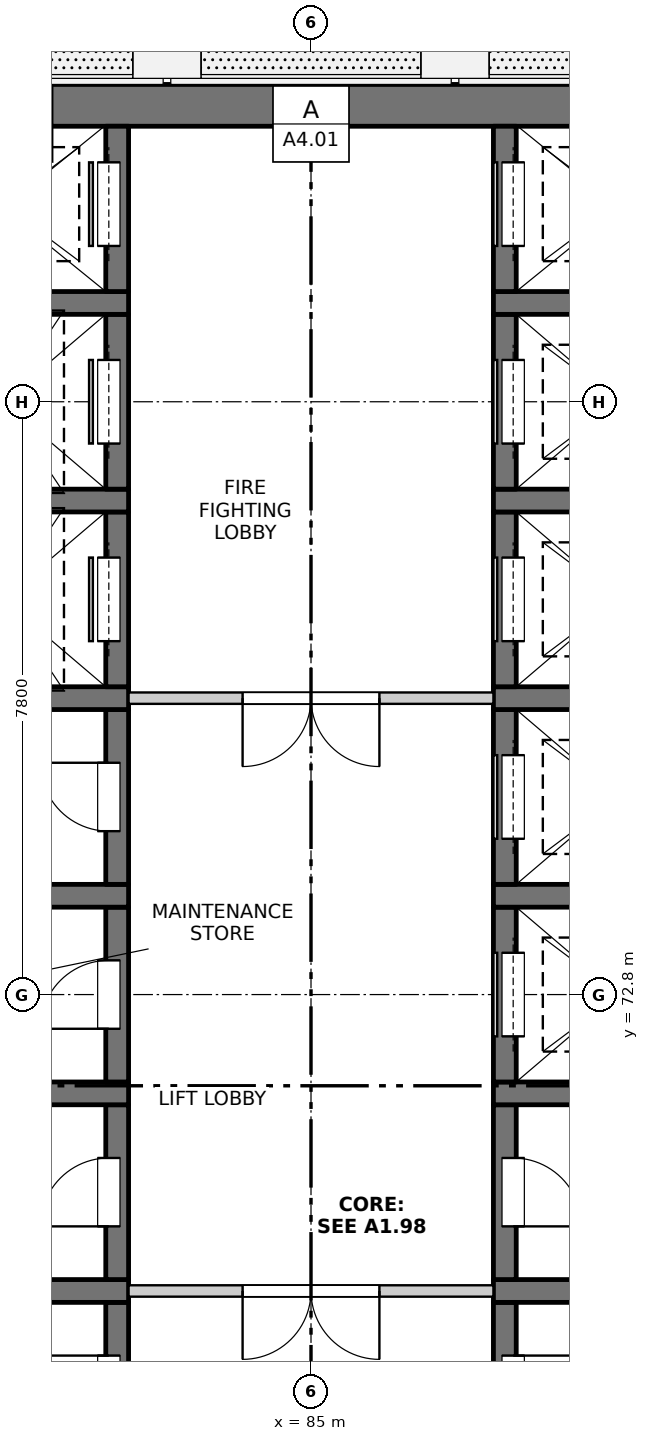
"""IFC4 building model, lengths in metres.
Left out: names, types, materials, properties, quantities, classifications, styles, units other than length and angle.
Written with IfcOpenShell. Run it as: python <this file> out.ifc"""

import sys

from ifc_helpers import new_model, si_unit, direction, frame, frame_2d, origin, place, context, subcontext, project, spatial, rectangle, extrude, element, fill, save


model = new_model("IFC4")
c1 = context("Model", 3, precision=1e-05, world=origin(), true_north=direction((0.0, 1.0)))
c2 = subcontext(c1, "Body", "Model", "MODEL_VIEW")
j1 = project(units=[si_unit("LENGTHUNIT", "METRE"), si_unit("PLANEANGLEUNIT", "RADIAN")], contexts=[c1])
p1 = place(None, origin())
s1 = spatial("IfcSite", under=j1, at=p1, CompositionType="ELEMENT")
p2 = place(p1, origin())
s2 = spatial("IfcBuilding", under=s1, at=p2, CompositionType="ELEMENT")
p3 = place(p2, frame((0.0, 0.0, 189.4)))
s3 = spatial("IfcBuildingStorey", under=s2, at=p3, CompositionType="ELEMENT", Elevation=189.4)
p4 = place(p3, frame((75.525, 84.5, -0.25), z_axis=(0.0, 0.0, 1.0), x_axis=(1.0, 0.0, 0.0)))
e1 = element("IfcWall", 1, at=p4, inside=s3, PredefinedType="SOLIDWALL", context=c2, shape_type="SweptSolid", body=[
    extrude(rectangle(XDim=18.95, YDim=0.55, at=frame_2d((9.475, 0.0))), origin(), (0.0, 0.0, 1.0), 3.35),
])
p5 = place(p3, frame((82.45, 66.45, -0.25), z_axis=(0.0, 0.0, 1.0), x_axis=(0.0, 1.0, 0.0)))
e2 = element("IfcWall", 2, at=p5, inside=s3, PredefinedType="SOLIDWALL", context=c2, shape_type="SweptSolid", body=[
    extrude(rectangle(XDim=2.3, YDim=0.3, at=frame_2d((1.15, 0.0))), origin(), (0.0, 0.0, 1.0), 3.35),
])
p6 = place(p5, frame((0.7, 0.0, 0.25)))
e3 = element("IfcOpeningElement", 3, at=p6, cuts=e2, PredefinedType="OPENING", context=c2, shape_type="SweptSolid", body=[
    extrude(rectangle(XDim=0.9, YDim=2.1, at=frame_2d((0.45, 1.05))), frame((0.0, 0.16, 0.0), z_axis=(0.0, -1.0, 0.0), x_axis=(1.0, 0.0, 0.0)), (0.0, 0.0, 1.0), 0.32),
])
p7 = place(p3, frame((79.6, 68.9, -0.25), z_axis=(0.0, 0.0, 1.0), x_axis=(1.0, 0.0, 0.0)))
e4 = element("IfcWall", 4, at=p7, inside=s3, PredefinedType="SOLIDWALL", context=c2, shape_type="SweptSolid", body=[
    extrude(rectangle(XDim=3.0, YDim=0.3, at=frame_2d((1.5, 0.0))), origin(), (0.0, 0.0, 1.0), 3.35),
])
p8 = place(p3, frame((82.45, 69.05, -0.25), z_axis=(0.0, 0.0, 1.0), x_axis=(0.0, 1.0, 0.0)))
e5 = element("IfcWall", 5, at=p8, inside=s3, PredefinedType="SOLIDWALL", context=c2, shape_type="SweptSolid", body=[
    extrude(rectangle(XDim=2.3, YDim=0.3, at=frame_2d((1.15, 0.0))), origin(), (0.0, 0.0, 1.0), 3.35),
])
p9 = place(p8, frame((0.7, 0.0, 0.25)))
e6 = element("IfcOpeningElement", 6, at=p9, cuts=e5, PredefinedType="OPENING", context=c2, shape_type="SweptSolid", body=[
    extrude(rectangle(XDim=0.9, YDim=2.1, at=frame_2d((0.45, 1.05))), frame((0.0, 0.16, 0.0), z_axis=(0.0, -1.0, 0.0), x_axis=(1.0, 0.0, 0.0)), (0.0, 0.0, 1.0), 0.32),
])
p10 = place(p3, frame((79.6, 71.5, -0.25), z_axis=(0.0, 0.0, 1.0), x_axis=(1.0, 0.0, 0.0)))
e7 = element("IfcWall", 7, at=p10, inside=s3, PredefinedType="SOLIDWALL", context=c2, shape_type="SweptSolid", body=[
    extrude(rectangle(XDim=3.0, YDim=0.3, at=frame_2d((1.5, 0.0))), origin(), (0.0, 0.0, 1.0), 3.35),
])
p11 = place(p3, frame((82.45, 71.65, -0.25), z_axis=(0.0, 0.0, 1.0), x_axis=(0.0, 1.0, 0.0)))
e8 = element("IfcWall", 8, at=p11, inside=s3, PredefinedType="SOLIDWALL", context=c2, shape_type="SweptSolid", body=[
    extrude(rectangle(XDim=2.3, YDim=0.3, at=frame_2d((1.15, 0.0))), origin(), (0.0, 0.0, 1.0), 3.35),
])
p12 = place(p11, frame((0.7, 0.0, 0.25)))
e9 = element("IfcOpeningElement", 9, at=p12, cuts=e8, PredefinedType="OPENING", context=c2, shape_type="SweptSolid", body=[
    extrude(rectangle(XDim=0.9, YDim=2.1, at=frame_2d((0.45, 1.05))), frame((0.0, 0.16, 0.0), z_axis=(0.0, -1.0, 0.0), x_axis=(1.0, 0.0, 0.0)), (0.0, 0.0, 1.0), 0.32),
])
p13 = place(p3, frame((79.6, 74.1, -0.25), z_axis=(0.0, 0.0, 1.0), x_axis=(1.0, 0.0, 0.0)))
e10 = element("IfcWall", 10, at=p13, inside=s3, PredefinedType="SOLIDWALL", context=c2, shape_type="SweptSolid", body=[
    extrude(rectangle(XDim=3.0, YDim=0.3, at=frame_2d((1.5, 0.0))), origin(), (0.0, 0.0, 1.0), 3.35),
])
p14 = place(p3, frame((82.45, 74.25, -0.25), z_axis=(0.0, 0.0, 1.0), x_axis=(0.0, 1.0, 0.0)))
e11 = element("IfcWall", 11, at=p14, inside=s3, PredefinedType="SOLIDWALL", context=c2, shape_type="SweptSolid", body=[
    extrude(rectangle(XDim=2.3, YDim=0.3, at=frame_2d((1.15, 0.0))), origin(), (0.0, 0.0, 1.0), 3.35),
])
p15 = place(p14, frame((0.7, 0.0, 0.25)))
e12 = element("IfcOpeningElement", 12, at=p15, cuts=e11, PredefinedType="OPENING", context=c2, shape_type="SweptSolid", body=[
    extrude(rectangle(XDim=0.9, YDim=2.1, at=frame_2d((0.45, 1.05))), frame((0.0, 0.16, 0.0), z_axis=(0.0, -1.0, 0.0), x_axis=(1.0, 0.0, 0.0)), (0.0, 0.0, 1.0), 0.32),
])
p16 = place(p3, frame((79.6, 76.7, -0.25), z_axis=(0.0, 0.0, 1.0), x_axis=(1.0, 0.0, 0.0)))
e13 = element("IfcWall", 13, at=p16, inside=s3, PredefinedType="SOLIDWALL", context=c2, shape_type="SweptSolid", body=[
    extrude(rectangle(XDim=3.0, YDim=0.3, at=frame_2d((1.5, 0.0))), origin(), (0.0, 0.0, 1.0), 3.35),
])
p17 = place(p3, frame((82.45, 76.85, -0.25), z_axis=(0.0, 0.0, 1.0), x_axis=(0.0, 1.0, 0.0)))
e14 = element("IfcWall", 14, at=p17, inside=s3, PredefinedType="SOLIDWALL", context=c2, shape_type="SweptSolid", body=[
    extrude(rectangle(XDim=2.3, YDim=0.3, at=frame_2d((1.15, 0.0))), origin(), (0.0, 0.0, 1.0), 3.35),
])
p18 = place(p17, frame((0.6, 0.0, 0.25)))
e15 = element("IfcOpeningElement", 15, at=p18, cuts=e14, PredefinedType="OPENING", context=c2, shape_type="SweptSolid", body=[
    extrude(rectangle(XDim=1.1, YDim=2.1, at=frame_2d((0.55, 1.05))), frame((0.0, 0.16, 0.0), z_axis=(0.0, -1.0, 0.0), x_axis=(1.0, 0.0, 0.0)), (0.0, 0.0, 1.0), 0.32),
])
p19 = place(p3, frame((79.6, 79.3, -0.25), z_axis=(0.0, 0.0, 1.0), x_axis=(1.0, 0.0, 0.0)))
e16 = element("IfcWall", 16, at=p19, inside=s3, PredefinedType="SOLIDWALL", context=c2, shape_type="SweptSolid", body=[
    extrude(rectangle(XDim=3.0, YDim=0.3, at=frame_2d((1.5, 0.0))), origin(), (0.0, 0.0, 1.0), 3.35),
])
p20 = place(p3, frame((82.45, 79.45, -0.25), z_axis=(0.0, 0.0, 1.0), x_axis=(0.0, 1.0, 0.0)))
e17 = element("IfcWall", 17, at=p20, inside=s3, PredefinedType="SOLIDWALL", context=c2, shape_type="SweptSolid", body=[
    extrude(rectangle(XDim=2.3, YDim=0.3, at=frame_2d((1.15, 0.0))), origin(), (0.0, 0.0, 1.0), 3.35),
])
p21 = place(p20, frame((0.6, 0.0, 0.25)))
e18 = element("IfcOpeningElement", 18, at=p21, cuts=e17, PredefinedType="OPENING", context=c2, shape_type="SweptSolid", body=[
    extrude(rectangle(XDim=1.1, YDim=2.1, at=frame_2d((0.55, 1.05))), frame((0.0, 0.16, 0.0), z_axis=(0.0, -1.0, 0.0), x_axis=(1.0, 0.0, 0.0)), (0.0, 0.0, 1.0), 0.32),
])
p22 = place(p3, frame((79.6, 81.9, -0.25), z_axis=(0.0, 0.0, 1.0), x_axis=(1.0, 0.0, 0.0)))
e19 = element("IfcWall", 19, at=p22, inside=s3, PredefinedType="SOLIDWALL", context=c2, shape_type="SweptSolid", body=[
    extrude(rectangle(XDim=3.0, YDim=0.3, at=frame_2d((1.5, 0.0))), origin(), (0.0, 0.0, 1.0), 3.35),
])
p23 = place(p3, frame((82.45, 82.05, -0.25), z_axis=(0.0, 0.0, 1.0), x_axis=(0.0, 1.0, 0.0)))
e20 = element("IfcWall", 20, at=p23, inside=s3, PredefinedType="SOLIDWALL", context=c2, shape_type="SweptSolid", body=[
    extrude(rectangle(XDim=2.175, YDim=0.3, at=frame_2d((1.087, 0.0))), origin(), (0.0, 0.0, 1.0), 3.35),
])
p24 = place(p23, frame((0.6, 0.0, 0.25)))
e21 = element("IfcOpeningElement", 21, at=p24, cuts=e20, PredefinedType="OPENING", context=c2, shape_type="SweptSolid", body=[
    extrude(rectangle(XDim=1.1, YDim=2.1, at=frame_2d((0.55, 1.05))), frame((0.0, 0.16, 0.0), z_axis=(0.0, -1.0, 0.0), x_axis=(1.0, 0.0, 0.0)), (0.0, 0.0, 1.0), 0.32),
])
p25 = place(p3, frame((87.55, 66.45, -0.25), z_axis=(0.0, 0.0, 1.0), x_axis=(0.0, 1.0, 0.0)))
e22 = element("IfcWall", 22, at=p25, inside=s3, PredefinedType="SOLIDWALL", context=c2, shape_type="SweptSolid", body=[
    extrude(rectangle(XDim=2.3, YDim=0.3, at=frame_2d((1.15, 0.0))), origin(), (0.0, 0.0, 1.0), 3.35),
])
p26 = place(p25, frame((0.7, 0.0, 0.25)))
e23 = element("IfcOpeningElement", 23, at=p26, cuts=e22, PredefinedType="OPENING", context=c2, shape_type="SweptSolid", body=[
    extrude(rectangle(XDim=0.9, YDim=2.1, at=frame_2d((0.45, 1.05))), frame((0.0, 0.16, 0.0), z_axis=(0.0, -1.0, 0.0), x_axis=(1.0, 0.0, 0.0)), (0.0, 0.0, 1.0), 0.32),
])
p27 = place(p3, frame((87.4, 68.9, -0.25), z_axis=(0.0, 0.0, 1.0), x_axis=(1.0, 0.0, 0.0)))
e24 = element("IfcWall", 24, at=p27, inside=s3, PredefinedType="SOLIDWALL", context=c2, shape_type="SweptSolid", body=[
    extrude(rectangle(XDim=3.0, YDim=0.3, at=frame_2d((1.5, 0.0))), origin(), (0.0, 0.0, 1.0), 3.35),
])
p28 = place(p3, frame((87.55, 69.05, -0.25), z_axis=(0.0, 0.0, 1.0), x_axis=(0.0, 1.0, 0.0)))
e25 = element("IfcWall", 25, at=p28, inside=s3, PredefinedType="SOLIDWALL", context=c2, shape_type="SweptSolid", body=[
    extrude(rectangle(XDim=2.3, YDim=0.3, at=frame_2d((1.15, 0.0))), origin(), (0.0, 0.0, 1.0), 3.35),
])
p29 = place(p28, frame((0.7, 0.0, 0.25)))
e26 = element("IfcOpeningElement", 26, at=p29, cuts=e25, PredefinedType="OPENING", context=c2, shape_type="SweptSolid", body=[
    extrude(rectangle(XDim=0.9, YDim=2.1, at=frame_2d((0.45, 1.05))), frame((0.0, 0.16, 0.0), z_axis=(0.0, -1.0, 0.0), x_axis=(1.0, 0.0, 0.0)), (0.0, 0.0, 1.0), 0.32),
])
p30 = place(p3, frame((87.4, 71.5, -0.25), z_axis=(0.0, 0.0, 1.0), x_axis=(1.0, 0.0, 0.0)))
e27 = element("IfcWall", 27, at=p30, inside=s3, PredefinedType="SOLIDWALL", context=c2, shape_type="SweptSolid", body=[
    extrude(rectangle(XDim=3.0, YDim=0.3, at=frame_2d((1.5, 0.0))), origin(), (0.0, 0.0, 1.0), 3.35),
])
p31 = place(p3, frame((87.55, 71.65, -0.25), z_axis=(0.0, 0.0, 1.0), x_axis=(0.0, 1.0, 0.0)))
e28 = element("IfcWall", 28, at=p31, inside=s3, PredefinedType="SOLIDWALL", context=c2, shape_type="SweptSolid", body=[
    extrude(rectangle(XDim=2.3, YDim=0.3, at=frame_2d((1.15, 0.0))), origin(), (0.0, 0.0, 1.0), 3.35),
])
p32 = place(p31, frame((0.6, 0.0, 0.25)))
e29 = element("IfcOpeningElement", 29, at=p32, cuts=e28, PredefinedType="OPENING", context=c2, shape_type="SweptSolid", body=[
    extrude(rectangle(XDim=1.1, YDim=2.1, at=frame_2d((0.55, 1.05))), frame((0.0, 0.16, 0.0), z_axis=(0.0, -1.0, 0.0), x_axis=(1.0, 0.0, 0.0)), (0.0, 0.0, 1.0), 0.32),
])
p33 = place(p3, frame((87.4, 74.1, -0.25), z_axis=(0.0, 0.0, 1.0), x_axis=(1.0, 0.0, 0.0)))
e30 = element("IfcWall", 30, at=p33, inside=s3, PredefinedType="SOLIDWALL", context=c2, shape_type="SweptSolid", body=[
    extrude(rectangle(XDim=3.0, YDim=0.3, at=frame_2d((1.5, 0.0))), origin(), (0.0, 0.0, 1.0), 3.35),
])
p34 = place(p3, frame((87.55, 74.25, -0.25), z_axis=(0.0, 0.0, 1.0), x_axis=(0.0, 1.0, 0.0)))
e31 = element("IfcWall", 31, at=p34, inside=s3, PredefinedType="SOLIDWALL", context=c2, shape_type="SweptSolid", body=[
    extrude(rectangle(XDim=2.3, YDim=0.3, at=frame_2d((1.15, 0.0))), origin(), (0.0, 0.0, 1.0), 3.35),
])
p35 = place(p34, frame((0.6, 0.0, 0.25)))
e32 = element("IfcOpeningElement", 32, at=p35, cuts=e31, PredefinedType="OPENING", context=c2, shape_type="SweptSolid", body=[
    extrude(rectangle(XDim=1.1, YDim=2.1, at=frame_2d((0.55, 1.05))), frame((0.0, 0.16, 0.0), z_axis=(0.0, -1.0, 0.0), x_axis=(1.0, 0.0, 0.0)), (0.0, 0.0, 1.0), 0.32),
])
p36 = place(p3, frame((87.4, 76.7, -0.25), z_axis=(0.0, 0.0, 1.0), x_axis=(1.0, 0.0, 0.0)))
e33 = element("IfcWall", 33, at=p36, inside=s3, PredefinedType="SOLIDWALL", context=c2, shape_type="SweptSolid", body=[
    extrude(rectangle(XDim=3.0, YDim=0.3, at=frame_2d((1.5, 0.0))), origin(), (0.0, 0.0, 1.0), 3.35),
])
p37 = place(p3, frame((87.55, 76.85, -0.25), z_axis=(0.0, 0.0, 1.0), x_axis=(0.0, 1.0, 0.0)))
e34 = element("IfcWall", 34, at=p37, inside=s3, PredefinedType="SOLIDWALL", context=c2, shape_type="SweptSolid", body=[
    extrude(rectangle(XDim=2.3, YDim=0.3, at=frame_2d((1.15, 0.0))), origin(), (0.0, 0.0, 1.0), 3.35),
])
p38 = place(p37, frame((0.6, 0.0, 0.25)))
e35 = element("IfcOpeningElement", 35, at=p38, cuts=e34, PredefinedType="OPENING", context=c2, shape_type="SweptSolid", body=[
    extrude(rectangle(XDim=1.1, YDim=2.1, at=frame_2d((0.55, 1.05))), frame((0.0, 0.16, 0.0), z_axis=(0.0, -1.0, 0.0), x_axis=(1.0, 0.0, 0.0)), (0.0, 0.0, 1.0), 0.32),
])
p39 = place(p3, frame((87.4, 79.3, -0.25), z_axis=(0.0, 0.0, 1.0), x_axis=(1.0, 0.0, 0.0)))
e36 = element("IfcWall", 36, at=p39, inside=s3, PredefinedType="SOLIDWALL", context=c2, shape_type="SweptSolid", body=[
    extrude(rectangle(XDim=3.0, YDim=0.3, at=frame_2d((1.5, 0.0))), origin(), (0.0, 0.0, 1.0), 3.35),
])
p40 = place(p3, frame((87.55, 79.45, -0.25), z_axis=(0.0, 0.0, 1.0), x_axis=(0.0, 1.0, 0.0)))
e37 = element("IfcWall", 37, at=p40, inside=s3, PredefinedType="SOLIDWALL", context=c2, shape_type="SweptSolid", body=[
    extrude(rectangle(XDim=2.3, YDim=0.3, at=frame_2d((1.15, 0.0))), origin(), (0.0, 0.0, 1.0), 3.35),
])
p41 = place(p40, frame((0.6, 0.0, 0.25)))
e38 = element("IfcOpeningElement", 38, at=p41, cuts=e37, PredefinedType="OPENING", context=c2, shape_type="SweptSolid", body=[
    extrude(rectangle(XDim=1.1, YDim=2.1, at=frame_2d((0.55, 1.05))), frame((0.0, 0.16, 0.0), z_axis=(0.0, -1.0, 0.0), x_axis=(1.0, 0.0, 0.0)), (0.0, 0.0, 1.0), 0.32),
])
p42 = place(p3, frame((87.4, 81.9, -0.25), z_axis=(0.0, 0.0, 1.0), x_axis=(1.0, 0.0, 0.0)))
e39 = element("IfcWall", 39, at=p42, inside=s3, PredefinedType="SOLIDWALL", context=c2, shape_type="SweptSolid", body=[
    extrude(rectangle(XDim=3.0, YDim=0.3, at=frame_2d((1.5, 0.0))), origin(), (0.0, 0.0, 1.0), 3.35),
])
p43 = place(p3, frame((87.55, 82.05, -0.25), z_axis=(0.0, 0.0, 1.0), x_axis=(0.0, 1.0, 0.0)))
e40 = element("IfcWall", 40, at=p43, inside=s3, PredefinedType="SOLIDWALL", context=c2, shape_type="SweptSolid", body=[
    extrude(rectangle(XDim=2.175, YDim=0.3, at=frame_2d((1.087, 0.0))), origin(), (0.0, 0.0, 1.0), 3.35),
])
p44 = place(p43, frame((0.6, 0.0, 0.25)))
e41 = element("IfcOpeningElement", 41, at=p44, cuts=e40, PredefinedType="OPENING", context=c2, shape_type="SweptSolid", body=[
    extrude(rectangle(XDim=1.1, YDim=2.1, at=frame_2d((0.55, 1.05))), frame((0.0, 0.16, 0.0), z_axis=(0.0, -1.0, 0.0), x_axis=(1.0, 0.0, 0.0)), (0.0, 0.0, 1.0), 0.32),
])
p45 = place(p3, frame((82.6, 68.9, 0.0), z_axis=(0.0, 0.0, 1.0), x_axis=(1.0, 0.0, 0.0)))
e42 = element("IfcWall", 42, at=p45, inside=s3, PredefinedType="PARTITIONING", context=c2, shape_type="SweptSolid", body=[
    extrude(rectangle(XDim=4.8, YDim=0.15, at=frame_2d((2.4, 0.0))), origin(), (0.0, 0.0, 1.0), 3.1),
])
p46 = place(p45, frame((1.5, 0.0, 0.0)))
e43 = element("IfcOpeningElement", 43, at=p46, cuts=e42, PredefinedType="OPENING", context=c2, shape_type="SweptSolid", body=[
    extrude(rectangle(XDim=1.8, YDim=2.1, at=frame_2d((0.9, 1.05))), frame((0.0, 0.085, 0.0), z_axis=(0.0, -1.0, 0.0), x_axis=(1.0, 0.0, 0.0)), (0.0, 0.0, 1.0), 0.17),
])
p47 = place(p3, frame((82.6, 76.7, 0.0), z_axis=(0.0, 0.0, 1.0), x_axis=(1.0, 0.0, 0.0)))
e44 = element("IfcWall", 44, at=p47, inside=s3, PredefinedType="PARTITIONING", context=c2, shape_type="SweptSolid", body=[
    extrude(rectangle(XDim=4.8, YDim=0.15, at=frame_2d((2.4, 0.0))), origin(), (0.0, 0.0, 1.0), 3.1),
])
p48 = place(p47, frame((1.5, 0.0, 0.0)))
e45 = element("IfcOpeningElement", 45, at=p48, cuts=e44, PredefinedType="OPENING", context=c2, shape_type="SweptSolid", body=[
    extrude(rectangle(XDim=1.8, YDim=2.1, at=frame_2d((0.9, 1.05))), frame((0.0, 0.085, 0.0), z_axis=(0.0, -1.0, 0.0), x_axis=(1.0, 0.0, 0.0)), (0.0, 0.0, 1.0), 0.17),
])
p49 = place(p6, origin())
e46 = element("IfcDoor", 46, at=p49, inside=s3, OperationType="SINGLE_SWING_RIGHT", PredefinedType="DOOR", context=c2, shape_type="SweptSolid", body=[
    extrude(rectangle(XDim=0.9, YDim=2.1, at=frame_2d((0.45, 1.05))), frame((0.0, 0.135, 0.0), z_axis=(0.0, -1.0, 0.0), x_axis=(1.0, 0.0, 0.0)), (0.0, 0.0, 1.0), 0.05),
])
fill(e3, e46)
p50 = place(p26, origin())
e47 = element("IfcDoor", 47, at=p50, inside=s3, OperationType="SINGLE_SWING_LEFT", PredefinedType="DOOR", context=c2, shape_type="SweptSolid", body=[
    extrude(rectangle(XDim=0.9, YDim=2.1, at=frame_2d((0.45, 1.05))), frame((0.0, -0.085, 0.0), z_axis=(0.0, -1.0, 0.0), x_axis=(1.0, 0.0, 0.0)), (0.0, 0.0, 1.0), 0.05),
])
fill(e23, e47)
p51 = place(p46, origin())
e48 = element("IfcDoor", 48, at=p51, inside=s3, OperationType="DOUBLE_DOOR_SINGLE_SWING", PredefinedType="DOOR", context=c2, shape_type="SweptSolid", body=[
    extrude(rectangle(XDim=1.8, YDim=2.1, at=frame_2d((0.9, 1.05))), frame((0.0, 0.025, 0.0), z_axis=(0.0, -1.0, 0.0), x_axis=(1.0, 0.0, 0.0)), (0.0, 0.0, 1.0), 0.05),
])
fill(e43, e48)
p52 = place(p9, origin())
e49 = element("IfcDoor", 49, at=p52, inside=s3, OperationType="SINGLE_SWING_LEFT", PredefinedType="DOOR", context=c2, shape_type="SweptSolid", body=[
    extrude(rectangle(XDim=0.9, YDim=2.1, at=frame_2d((0.45, 1.05))), frame((0.0, 0.135, 0.0), z_axis=(0.0, -1.0, 0.0), x_axis=(1.0, 0.0, 0.0)), (0.0, 0.0, 1.0), 0.05),
])
fill(e6, e49)
p53 = place(p29, origin())
e50 = element("IfcDoor", 50, at=p53, inside=s3, OperationType="SINGLE_SWING_RIGHT", PredefinedType="DOOR", context=c2, shape_type="SweptSolid", body=[
    extrude(rectangle(XDim=0.9, YDim=2.1, at=frame_2d((0.45, 1.05))), frame((0.0, -0.085, 0.0), z_axis=(0.0, -1.0, 0.0), x_axis=(1.0, 0.0, 0.0)), (0.0, 0.0, 1.0), 0.05),
])
fill(e26, e50)
p54 = place(p12, origin())
e51 = element("IfcDoor", 51, at=p54, inside=s3, OperationType="SINGLE_SWING_LEFT", PredefinedType="DOOR", context=c2, shape_type="SweptSolid", body=[
    extrude(rectangle(XDim=0.9, YDim=2.1, at=frame_2d((0.45, 1.05))), frame((0.0, 0.135, 0.0), z_axis=(0.0, -1.0, 0.0), x_axis=(1.0, 0.0, 0.0)), (0.0, 0.0, 1.0), 0.05),
])
fill(e9, e51)
p55 = place(p32, origin())
e52 = element("IfcDoor", 52, at=p55, inside=s3, OperationType="SLIDING_TO_LEFT", PredefinedType="DOOR", context=c2, shape_type="SweptSolid", body=[
    extrude(rectangle(XDim=1.1, YDim=2.1, at=frame_2d((0.55, 1.05))), frame((0.0, -0.085, 0.0), z_axis=(0.0, -1.0, 0.0), x_axis=(1.0, 0.0, 0.0)), (0.0, 0.0, 1.0), 0.05),
])
fill(e29, e52)
p56 = place(p15, origin())
e53 = element("IfcDoor", 53, at=p56, inside=s3, OperationType="SINGLE_SWING_RIGHT", PredefinedType="DOOR", context=c2, shape_type="SweptSolid", body=[
    extrude(rectangle(XDim=0.9, YDim=2.1, at=frame_2d((0.45, 1.05))), frame((0.0, 0.135, 0.0), z_axis=(0.0, -1.0, 0.0), x_axis=(1.0, 0.0, 0.0)), (0.0, 0.0, 1.0), 0.05),
])
fill(e12, e53)
p57 = place(p35, origin())
e54 = element("IfcDoor", 54, at=p57, inside=s3, OperationType="SLIDING_TO_LEFT", PredefinedType="DOOR", context=c2, shape_type="SweptSolid", body=[
    extrude(rectangle(XDim=1.1, YDim=2.1, at=frame_2d((0.55, 1.05))), frame((0.0, -0.085, 0.0), z_axis=(0.0, -1.0, 0.0), x_axis=(1.0, 0.0, 0.0)), (0.0, 0.0, 1.0), 0.05),
])
fill(e32, e54)
p58 = place(p48, origin())
e55 = element("IfcDoor", 55, at=p58, inside=s3, OperationType="DOUBLE_DOOR_SINGLE_SWING", PredefinedType="DOOR", context=c2, shape_type="SweptSolid", body=[
    extrude(rectangle(XDim=1.8, YDim=2.1, at=frame_2d((0.9, 1.05))), frame((0.0, 0.025, 0.0), z_axis=(0.0, -1.0, 0.0), x_axis=(1.0, 0.0, 0.0)), (0.0, 0.0, 1.0), 0.05),
])
fill(e45, e55)
p59 = place(p18, origin())
e56 = element("IfcDoor", 56, at=p59, inside=s3, OperationType="SLIDING_TO_LEFT", PredefinedType="DOOR", context=c2, shape_type="SweptSolid", body=[
    extrude(rectangle(XDim=1.1, YDim=2.1, at=frame_2d((0.55, 1.05))), frame((0.0, 0.135, 0.0), z_axis=(0.0, -1.0, 0.0), x_axis=(1.0, 0.0, 0.0)), (0.0, 0.0, 1.0), 0.05),
])
fill(e15, e56)
p60 = place(p38, origin())
e57 = element("IfcDoor", 57, at=p60, inside=s3, OperationType="SLIDING_TO_LEFT", PredefinedType="DOOR", context=c2, shape_type="SweptSolid", body=[
    extrude(rectangle(XDim=1.1, YDim=2.1, at=frame_2d((0.55, 1.05))), frame((0.0, -0.085, 0.0), z_axis=(0.0, -1.0, 0.0), x_axis=(1.0, 0.0, 0.0)), (0.0, 0.0, 1.0), 0.05),
])
fill(e35, e57)
p61 = place(p21, origin())
e58 = element("IfcDoor", 58, at=p61, inside=s3, OperationType="SLIDING_TO_LEFT", PredefinedType="DOOR", context=c2, shape_type="SweptSolid", body=[
    extrude(rectangle(XDim=1.1, YDim=2.1, at=frame_2d((0.55, 1.05))), frame((0.0, 0.135, 0.0), z_axis=(0.0, -1.0, 0.0), x_axis=(1.0, 0.0, 0.0)), (0.0, 0.0, 1.0), 0.05),
])
fill(e18, e58)
p62 = place(p41, origin())
e59 = element("IfcDoor", 59, at=p62, inside=s3, OperationType="SLIDING_TO_RIGHT", PredefinedType="DOOR", context=c2, shape_type="SweptSolid", body=[
    extrude(rectangle(XDim=1.1, YDim=2.1, at=frame_2d((0.55, 1.05))), frame((0.0, -0.085, 0.0), z_axis=(0.0, -1.0, 0.0), x_axis=(1.0, 0.0, 0.0)), (0.0, 0.0, 1.0), 0.05),
])
fill(e38, e59)
p63 = place(p24, origin())
e60 = element("IfcDoor", 60, at=p63, inside=s3, OperationType="SLIDING_TO_RIGHT", PredefinedType="DOOR", context=c2, shape_type="SweptSolid", body=[
    extrude(rectangle(XDim=1.1, YDim=2.1, at=frame_2d((0.55, 1.05))), frame((0.0, 0.135, 0.0), z_axis=(0.0, -1.0, 0.0), x_axis=(1.0, 0.0, 0.0)), (0.0, 0.0, 1.0), 0.05),
])
fill(e21, e60)
p64 = place(p44, origin())
e61 = element("IfcDoor", 61, at=p64, inside=s3, OperationType="SLIDING_TO_RIGHT", PredefinedType="DOOR", context=c2, shape_type="SweptSolid", body=[
    extrude(rectangle(XDim=1.1, YDim=2.1, at=frame_2d((0.55, 1.05))), frame((0.0, -0.085, 0.0), z_axis=(0.0, -1.0, 0.0), x_axis=(1.0, 0.0, 0.0)), (0.0, 0.0, 1.0), 0.05),
])
fill(e41, e61)
save(model, sys.argv[1])
